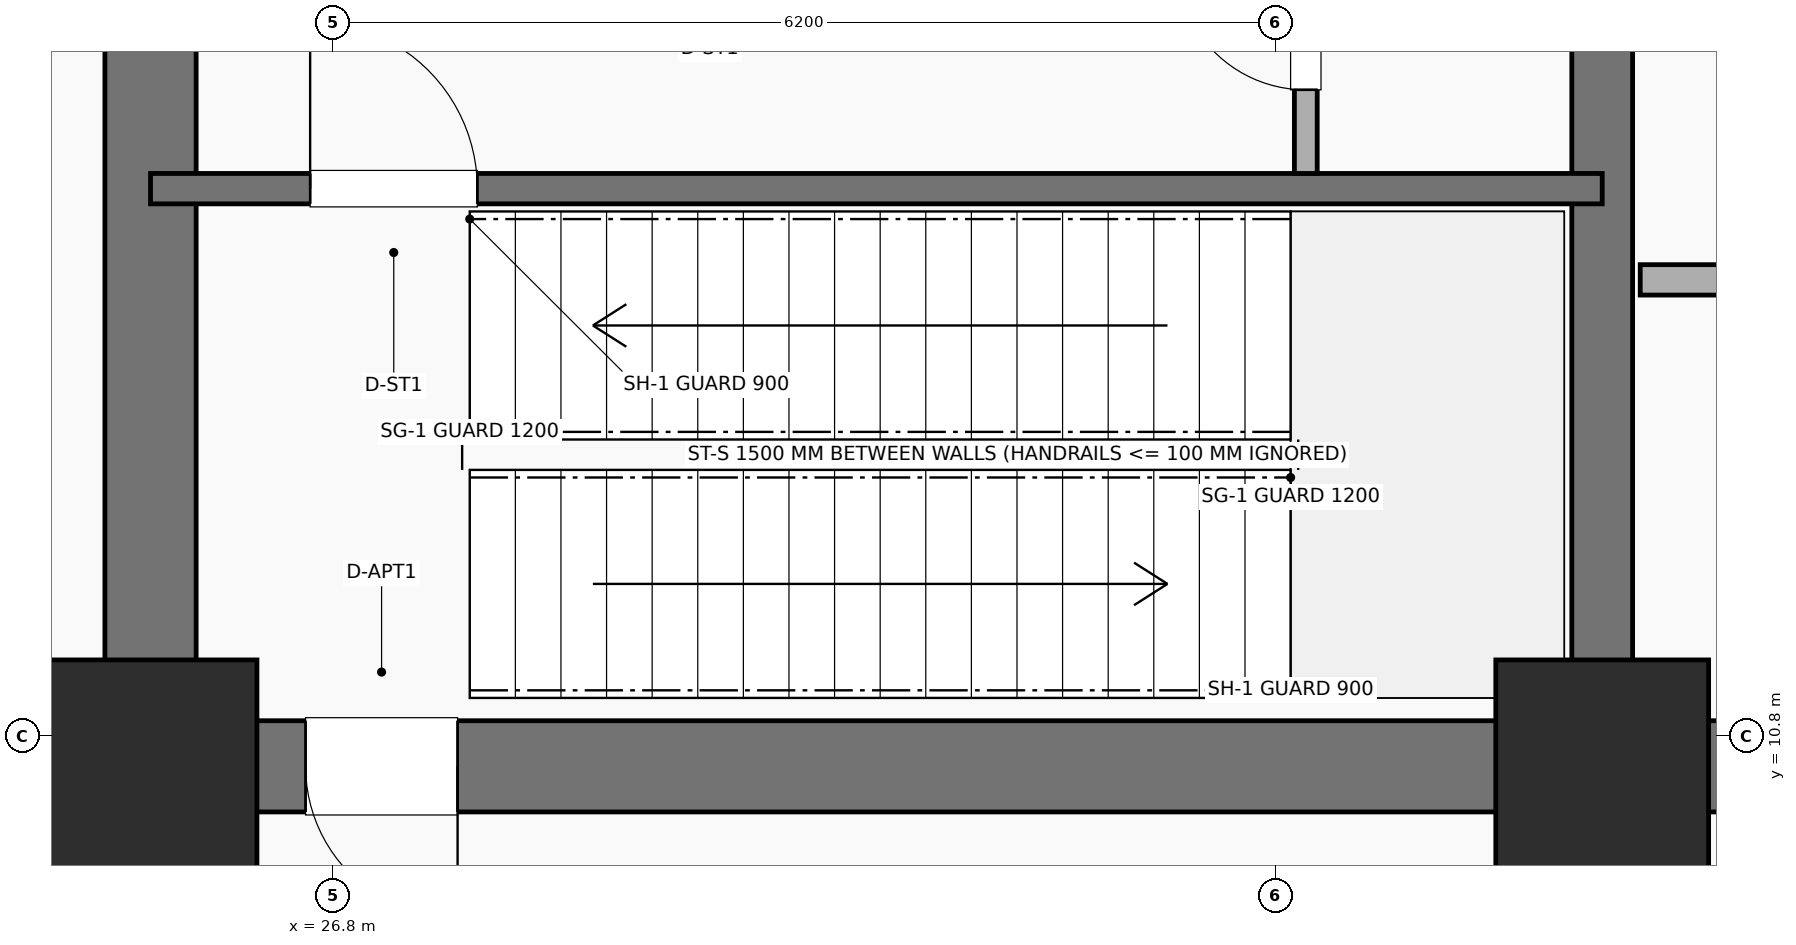
"""IFC4 building model, lengths in metres.
Left out: names, types, materials, properties, quantities, classifications, styles, units other than length and angle.
Written with IfcOpenShell. Run it as: python <this file> out.ifc"""

import sys

from ifc_helpers import new_model, si_unit, direction, frame, frame_2d, origin, origin_2d, place, context, subcontext, project, spatial, rectangle, extrude, element, fill, save


model = new_model("IFC4")
c1 = context("Model", 3, precision=1e-05, world=origin(), true_north=direction((0.0, 1.0)))
c2 = subcontext(c1, "Body", "Model", "MODEL_VIEW")
j1 = project(units=[si_unit("LENGTHUNIT", "METRE"), si_unit("PLANEANGLEUNIT", "RADIAN")], contexts=[c1])
p1 = place(None, origin())
s1 = spatial("IfcSite", under=j1, at=p1, CompositionType="ELEMENT")
p2 = place(p1, origin())
s2 = spatial("IfcBuilding", under=s1, at=p2, CompositionType="ELEMENT")
p3 = place(p2, origin())
s3 = spatial("IfcBuildingStorey", under=s2, at=p3, CompositionType="ELEMENT", Elevation=0.0)
p4 = place(p3, frame((52.8, 10.6, 0.0), z_axis=(0.0, 0.0, 1.0), x_axis=(-1.0, 0.0, 0.0)))
e1 = element("IfcWall", 1, at=p4, inside=s3, PredefinedType="SHEAR", context=c2, shape_type="SweptSolid", body=[
    extrude(rectangle(XDim=27.2, YDim=0.6, at=frame_2d((13.6, 0.0))), origin(), (0.0, 0.0, 1.0), 6.6),
])
p5 = place(p4, frame((25.18, 0.0, 0.0)))
e2 = element("IfcOpeningElement", 2, at=p5, cuts=e1, PredefinedType="OPENING", context=c2, shape_type="SweptSolid", body=[
    extrude(rectangle(XDim=1.0, YDim=2.15, at=frame_2d((0.5, 1.075))), frame((0.0, 0.31, 0.0), z_axis=(0.0, -1.0, 0.0), x_axis=(1.0, 0.0, 0.0)), (0.0, 0.0, 1.0), 0.62),
])
p6 = place(p3, frame((25.6, 10.9, 0.0), z_axis=(0.0, 0.0, 1.0), x_axis=(0.0, 1.0, 0.0)))
e3 = element("IfcWall", 3, at=p6, inside=s3, PredefinedType="SHEAR", context=c2, shape_type="SweptSolid", body=[
    extrude(rectangle(XDim=5.6, YDim=0.6, at=frame_2d((2.8, 0.0))), origin(), (0.0, 0.0, 1.0), 6.6),
])
p7 = place(p3, frame((35.15, 10.9, 0.0), z_axis=(0.0, 0.0, 1.0), x_axis=(0.0, 1.0, 0.0)))
e4 = element("IfcWall", 4, at=p7, inside=s3, PredefinedType="SHEAR", context=c2, shape_type="SweptSolid", body=[
    extrude(rectangle(XDim=5.6, YDim=0.4, at=frame_2d((2.8, 0.0))), origin(), (0.0, 0.0, 1.0), 6.6),
])
for number, where, z_axis, x_axis in (
    (5, (25.6, 10.6, 0.0), (0.0, 0.0, 1.0), (1.0, 0.0, 0.0)),
    (6, (35.15, 10.6, 0.0), (0.0, 0.0, 1.0), (1.0, 0.0, 0.0)),
):
    element("IfcColumn", number, at=place(p3, frame(where, z_axis=z_axis, x_axis=x_axis)), inside=s3, PredefinedType="COLUMN", context=c2, shape_type="SweptSolid", body=[
        extrude(rectangle(XDim=1.4, YDim=1.4, at=origin_2d()), origin(), (0.0, 0.0, 1.0), 6.6),
    ])
p8 = place(p3, frame((25.6, 14.4, 0.0), z_axis=(0.0, 0.0, 1.0), x_axis=(1.0, 0.0, 0.0)))
e7 = element("IfcWall", 7, at=p8, inside=s3, PredefinedType="SHEAR", context=c2, shape_type="SweptSolid", body=[
    extrude(rectangle(XDim=9.55, YDim=0.2, at=frame_2d((4.775, 0.0))), origin(), (0.0, 0.0, 1.0), 6.6),
])
p9 = place(p8, frame((1.05, 0.0, 0.0)))
e8 = element("IfcOpeningElement", 8, at=p9, cuts=e7, PredefinedType="OPENING", context=c2, shape_type="SweptSolid", body=[
    extrude(rectangle(XDim=1.1, YDim=2.15, at=frame_2d((0.55, 1.075))), frame((0.0, 0.11, 0.0), z_axis=(0.0, -1.0, 0.0), x_axis=(1.0, 0.0, 0.0)), (0.0, 0.0, 1.0), 0.22),
])
p10 = place(p3, frame((33.2, 14.5, 0.0), z_axis=(0.0, 0.0, 1.0), x_axis=(0.0, 1.0, 0.0)))
e9 = element("IfcWall", 9, at=p10, inside=s3, PredefinedType="PARTITIONING", context=c2, shape_type="SweptSolid", body=[
    extrude(rectangle(XDim=2.08, YDim=0.15, at=frame_2d((1.04, 0.0))), origin(), (0.0, 0.0, 1.0), 5.52),
])
p11 = place(p10, frame((0.55, 0.0, 0.0)))
e10 = element("IfcOpeningElement", 10, at=p11, cuts=e9, PredefinedType="OPENING", context=c2, shape_type="SweptSolid", body=[
    extrude(rectangle(XDim=0.85, YDim=2.05, at=frame_2d((0.425, 1.025))), frame((0.0, 0.085, 0.0), z_axis=(0.0, -1.0, 0.0), x_axis=(1.0, 0.0, 0.0)), (0.0, 0.0, 1.0), 0.17),
])
p12 = place(p3, frame((35.4, 13.8, 0.0), z_axis=(0.0, 0.0, 1.0), x_axis=(1.0, 0.0, 0.0)))
e11 = element("IfcWall", 11, at=p12, inside=s3, PredefinedType="PARTITIONING", context=c2, shape_type="SweptSolid", body=[
    extrude(rectangle(XDim=7.6, YDim=0.2, at=frame_2d((3.8, 0.0))), origin(), (0.0, 0.0, 1.0), 5.18),
])
p13 = place(p12, frame((0.7, 0.0, 0.0)))
e12 = element("IfcOpeningElement", 12, at=p13, cuts=e11, PredefinedType="OPENING", context=c2, shape_type="SweptSolid", body=[
    extrude(rectangle(XDim=1.1, YDim=2.15, at=frame_2d((0.55, 1.075))), frame((0.0, 0.11, 0.0), z_axis=(0.0, -1.0, 0.0), x_axis=(1.0, 0.0, 0.0)), (0.0, 0.0, 1.0), 0.22),
])
p14 = place(p12, frame((3.35, 0.0, 0.0)))
e13 = element("IfcOpeningElement", 13, at=p14, cuts=e11, PredefinedType="OPENING", context=c2, shape_type="SweptSolid", body=[
    extrude(rectangle(XDim=1.2, YDim=2.15, at=frame_2d((0.6, 1.075))), frame((0.0, 0.11, 0.0), z_axis=(0.0, -1.0, 0.0), x_axis=(1.0, 0.0, 0.0)), (0.0, 0.0, 1.0), 0.22),
])
p15 = place(p9, origin())
e14 = element("IfcDoor", 14, at=p15, inside=s3, OperationType="SINGLE_SWING_LEFT", PredefinedType="DOOR", context=c2, shape_type="SweptSolid", body=[
    extrude(rectangle(XDim=1.1, YDim=2.15, at=frame_2d((0.55, 1.075))), frame((0.0, 0.025, 0.0), z_axis=(0.0, -1.0, 0.0), x_axis=(1.0, 0.0, 0.0)), (0.0, 0.0, 1.0), 0.05),
])
fill(e8, e14)
p16 = place(p11, origin())
e15 = element("IfcDoor", 15, at=p16, inside=s3, OperationType="SINGLE_SWING_RIGHT", PredefinedType="TRAPDOOR", context=c2, shape_type="SweptSolid", body=[
    extrude(rectangle(XDim=0.85, YDim=2.05, at=frame_2d((0.425, 1.025))), frame((0.0, 0.025, 0.0), z_axis=(0.0, -1.0, 0.0), x_axis=(1.0, 0.0, 0.0)), (0.0, 0.0, 1.0), 0.05),
])
fill(e10, e15)
p17 = place(p5, origin())
e16 = element("IfcDoor", 16, at=p17, inside=s3, OperationType="SINGLE_SWING_LEFT", PredefinedType="DOOR", context=c2, shape_type="SweptSolid", body=[
    extrude(rectangle(XDim=1.0, YDim=2.15, at=frame_2d((0.5, 1.075))), frame((0.0, 0.025, 0.0), z_axis=(0.0, -1.0, 0.0), x_axis=(1.0, 0.0, 0.0)), (0.0, 0.0, 1.0), 0.05),
])
fill(e2, e16)
save(model, sys.argv[1])
